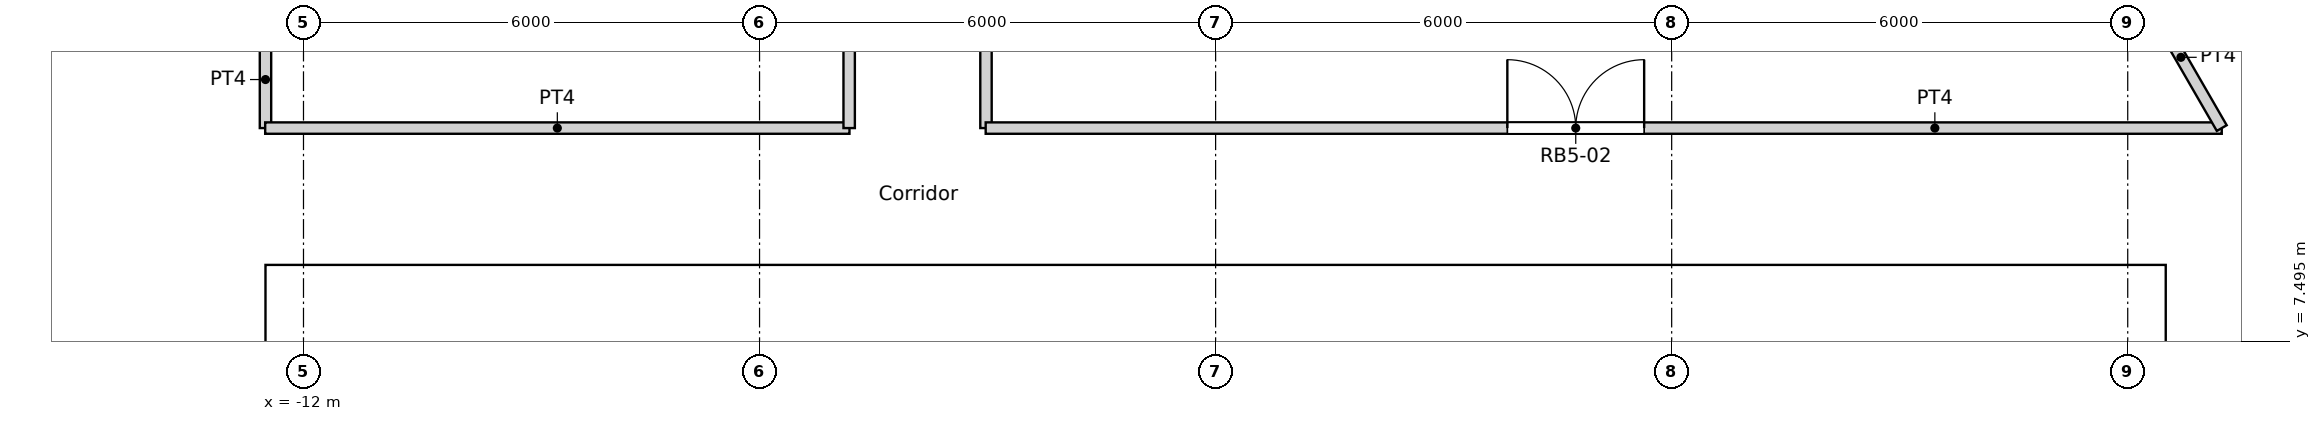
"""IFC4 building model, lengths in metres.
Left out: names, types, materials, properties, quantities, classifications, styles, units other than length and angle.
Written with IfcOpenShell. Run it as: python <this file> out.ifc"""

import sys

from ifc_helpers import new_model, si_unit, direction, frame, frame_2d, origin, place, context, subcontext, project, spatial, rectangle, extrude, element, fill, save


model = new_model("IFC4")
c1 = context("Model", 3, precision=1e-05, world=origin(), true_north=direction((0.0, 1.0)))
c2 = subcontext(c1, "Body", "Model", "MODEL_VIEW")
j1 = project(units=[si_unit("LENGTHUNIT", "METRE"), si_unit("PLANEANGLEUNIT", "RADIAN")], contexts=[c1])
p1 = place(None, origin())
s1 = spatial("IfcSite", under=j1, at=p1, CompositionType="ELEMENT")
p2 = place(p1, origin())
s2 = spatial("IfcBuilding", under=s1, at=p2, CompositionType="ELEMENT")
p3 = place(p2, frame((0.0, 0.0, 169.2)))
s3 = spatial("IfcBuildingStorey", under=s2, at=p3, CompositionType="ELEMENT", Elevation=169.2)
p4 = place(p3, frame((-12.5, 8.05, 0.0), z_axis=(0.0, 0.0, 1.0), x_axis=(1.0, 0.0, 0.0)))
e1 = element("IfcWall", 1, at=p4, inside=s3, PredefinedType="SOLIDWALL", context=c2, shape_type="SweptSolid", body=[
    extrude(rectangle(XDim=25.0, YDim=0.9, at=frame_2d((12.5, 0.0))), origin(), (0.0, 0.0, 1.0), 3.6),
])
p5 = place(p4, frame((8.3, 0.0, 0.0)))
e2 = element("IfcOpeningElement", 2, at=p5, cuts=e1, PredefinedType="OPENING", context=c2, shape_type="SweptSolid", body=[
    extrude(rectangle(XDim=1.8, YDim=2.1, at=frame_2d((0.9, 1.05))), frame((0.0, 0.45, 0.0), z_axis=(0.0, -1.0, 0.0), x_axis=(1.0, 0.0, 0.0)), (0.0, 0.0, 1.0), 0.9),
])
p6 = place(p3, frame((-12.05, -7.6, 0.0), z_axis=(0.0, 0.0, 1.0), x_axis=(0.0, 1.0, 0.0)))
e3 = element("IfcWall", 3, at=p6, inside=s3, PredefinedType="SOLIDWALL", context=c2, shape_type="SweptSolid", body=[
    extrude(rectangle(XDim=15.2, YDim=0.9, at=frame_2d((7.6, 0.0))), origin(), (0.0, 0.0, 1.0), 3.6),
])
p7 = place(p6, frame((7.1, 0.0, 0.0)))
e4 = element("IfcOpeningElement", 4, at=p7, cuts=e3, PredefinedType="OPENING", context=c2, shape_type="SweptSolid", body=[
    extrude(rectangle(XDim=1.0, YDim=2.1, at=frame_2d((0.5, 1.05))), frame((0.0, 0.45, 0.0), z_axis=(0.0, -1.0, 0.0), x_axis=(1.0, 0.0, 0.0)), (0.0, 0.0, 1.0), 0.9),
])
p8 = place(p3, frame((12.05, -7.6, 0.0), z_axis=(0.0, 0.0, 1.0), x_axis=(0.0, 1.0, 0.0)))
e5 = element("IfcWall", 5, at=p8, inside=s3, PredefinedType="SOLIDWALL", context=c2, shape_type="SweptSolid", body=[
    extrude(rectangle(XDim=15.2, YDim=0.9, at=frame_2d((7.6, 0.0))), origin(), (0.0, 0.0, 1.0), 3.6),
])
p9 = place(p8, frame((5.1, 0.0, 0.0)))
e6 = element("IfcOpeningElement", 6, at=p9, cuts=e5, PredefinedType="OPENING", context=c2, shape_type="SweptSolid", body=[
    extrude(rectangle(XDim=1.0, YDim=2.1, at=frame_2d((0.5, 1.05))), frame((0.0, 0.45, 0.0), z_axis=(0.0, -1.0, 0.0), x_axis=(1.0, 0.0, 0.0)), (0.0, 0.0, 1.0), 0.9),
])
for number, where, z_axis, x_axis in (
    (7, (-2.25, 3.25, 0.0), (0.0, 0.0, 1.0), (0.0, 1.0, 0.0)),
    (8, (0.55, 3.25, 0.0), (0.0, 0.0, 1.0), (0.0, 1.0, 0.0)),
):
    element("IfcWall", number, at=place(p3, frame(where, z_axis=z_axis, x_axis=x_axis)), inside=s3, PredefinedType="SOLIDWALL", context=c2, shape_type="SweptSolid", body=[
        extrude(rectangle(XDim=4.35, YDim=0.3, at=frame_2d((2.175, 0.0))), origin(), (0.0, 0.0, 1.0), 3.3),
    ])
p10 = place(p3, frame((-9.05, -7.0, 0.0), z_axis=(0.0, 0.0, 1.0), x_axis=(0.0, 1.0, 0.0)))
e9 = element("IfcWall", 9, at=p10, inside=s3, PredefinedType="SOLIDWALL", context=c2, shape_type="SweptSolid", body=[
    extrude(rectangle(XDim=14.6, YDim=0.3, at=frame_2d((7.3, 0.0))), origin(), (0.0, 0.0, 1.0), 3.3),
])
p11 = place(p3, frame((-4.275, 6.7, 0.0), z_axis=(0.0, 0.0, 1.0), x_axis=(0.0, 1.0, 0.0)))
e10 = element("IfcWall", 10, at=p11, inside=s3, PredefinedType="SOLIDWALL", context=c2, shape_type="SweptSolid", body=[
    extrude(rectangle(XDim=0.9, YDim=0.15, at=frame_2d((0.45, 0.0))), origin(), (0.0, 0.0, 1.0), 3.3),
])
p12 = place(p3, frame((0.7, 7.15, 0.0), z_axis=(0.0, 0.0, 1.0), x_axis=(1.0, 0.0, 0.0)))
e11 = element("IfcWall", 11, at=p12, inside=s3, PredefinedType="SOLIDWALL", context=c2, shape_type="SweptSolid", body=[
    extrude(rectangle(XDim=8.35, YDim=0.9, at=frame_2d((4.175, 0.0))), origin(), (0.0, 0.0, 1.0), 3.3),
])
p13 = place(p3, frame((-12.504, 10.3, 0.0), z_axis=(0.0, 0.0, 1.0), x_axis=(1.0, 0.0, 0.0)))
e12 = element("IfcWall", 12, at=p13, inside=s3, PredefinedType="PARTITIONING", context=c2, shape_type="SweptSolid", body=[
    extrude(rectangle(XDim=7.687, YDim=0.15, at=frame_2d((3.844, 0.0))), origin(), (0.0, 0.0, 1.0), 3.3),
])
p14 = place(p3, frame((-3.025, 10.3, 0.0), z_axis=(0.0, 0.0, 1.0), x_axis=(1.0, 0.0, 0.0)))
e13 = element("IfcWall", 13, at=p14, inside=s3, PredefinedType="PARTITIONING", context=c2, shape_type="SweptSolid", body=[
    extrude(rectangle(XDim=16.262, YDim=0.15, at=frame_2d((8.131, 0.0))), origin(), (0.0, 0.0, 1.0), 3.3),
])
p15 = place(p14, frame((6.863, 0.0, 0.0)))
e14 = element("IfcOpeningElement", 14, at=p15, cuts=e13, PredefinedType="OPENING", context=c2, shape_type="SweptSolid", body=[
    extrude(rectangle(XDim=1.8, YDim=2.1, at=frame_2d((0.9, 1.05))), frame((0.0, 0.075, 0.0), z_axis=(0.0, -1.0, 0.0), x_axis=(1.0, 0.0, 0.0)), (0.0, 0.0, 1.0), 0.15),
])
p16 = place(p3, frame((12.162, 12.162, 0.0), z_axis=(0.0, 0.0, 1.0), x_axis=(0.499961633463, -0.866047553582, 0.0)))
e15 = element("IfcWall", 15, at=p16, inside=s3, PredefinedType="PARTITIONING", context=c2, shape_type="SweptSolid", body=[
    extrude(rectangle(XDim=2.15, YDim=0.15, at=frame_2d((1.075, 0.0))), origin(), (0.0, 0.0, 1.0), 3.3),
])
p17 = place(p3, frame((-4.821, 10.3, 0.0), z_axis=(0.0, 0.0, 1.0), x_axis=(0.0, 1.0, 0.0)))
e16 = element("IfcWall", 16, at=p17, inside=s3, PredefinedType="PARTITIONING", context=c2, shape_type="SweptSolid", body=[
    extrude(rectangle(XDim=6.101, YDim=0.15, at=frame_2d((3.05, 0.0))), origin(), (0.0, 0.0, 1.0), 3.3),
])
p18 = place(p3, frame((-3.021, 10.3, 0.0), z_axis=(0.0, 0.0, 1.0), x_axis=(0.0, 1.0, 0.0)))
e17 = element("IfcWall", 17, at=p18, inside=s3, PredefinedType="PARTITIONING", context=c2, shape_type="SweptSolid", body=[
    extrude(rectangle(XDim=6.314, YDim=0.15, at=frame_2d((3.157, 0.0))), origin(), (0.0, 0.0, 1.0), 3.3),
])
p19 = place(p3, frame((-12.5, 10.3, 0.0), z_axis=(0.0, 0.0, 1.0), x_axis=(0.0, 1.0, 0.0)))
e18 = element("IfcWall", 18, at=p19, inside=s3, PredefinedType="PARTITIONING", context=c2, shape_type="SweptSolid", body=[
    extrude(rectangle(XDim=1.277, YDim=0.15, at=frame_2d((0.638, 0.0))), origin(), (0.0, 0.0, 1.0), 3.3),
])
p20 = place(p3, frame((-18.688, 6.802, 0.0), z_axis=(0.0, 0.0, 1.0), x_axis=(0.499914202267, 0.866074933462, 0.0)))
e19 = element("IfcWall", 19, at=p20, inside=s3, PredefinedType="PARTITIONING", context=c2, shape_type="SweptSolid", body=[
    extrude(rectangle(XDim=6.907, YDim=0.15, at=frame_2d((3.454, 0.0))), origin(), (0.0, 0.0, 1.0), 3.3),
])
p21 = place(p20, frame((3.004, 0.0, 0.0)))
e20 = element("IfcOpeningElement", 20, at=p21, cuts=e19, PredefinedType="OPENING", context=c2, shape_type="SweptSolid", body=[
    extrude(rectangle(XDim=1.0, YDim=2.04, at=frame_2d((0.5, 1.02))), frame((0.0, 0.075, 0.0), z_axis=(0.0, -1.0, 0.0), x_axis=(1.0, 0.0, 0.0)), (0.0, 0.0, 1.0), 0.15),
])
p22 = place(p5, origin())
e21 = element("IfcDoor", 21, at=p22, inside=s3, OperationType="DOUBLE_DOOR_SINGLE_SWING", PredefinedType="DOOR", context=c2, shape_type="SweptSolid", body=[
    extrude(rectangle(XDim=1.8, YDim=2.1, at=frame_2d((0.9, 1.05))), frame((0.0, 0.025, 0.0), z_axis=(0.0, -1.0, 0.0), x_axis=(1.0, 0.0, 0.0)), (0.0, 0.0, 1.0), 0.05),
])
fill(e2, e21)
p23 = place(p15, origin())
e22 = element("IfcDoor", 22, at=p23, inside=s3, OperationType="DOUBLE_DOOR_SINGLE_SWING", PredefinedType="DOOR", context=c2, shape_type="SweptSolid", body=[
    extrude(rectangle(XDim=1.8, YDim=2.1, at=frame_2d((0.9, 1.05))), frame((0.0, 0.025, 0.0), z_axis=(0.0, -1.0, 0.0), x_axis=(1.0, 0.0, 0.0)), (0.0, 0.0, 1.0), 0.05),
])
fill(e14, e22)
save(model, sys.argv[1])
